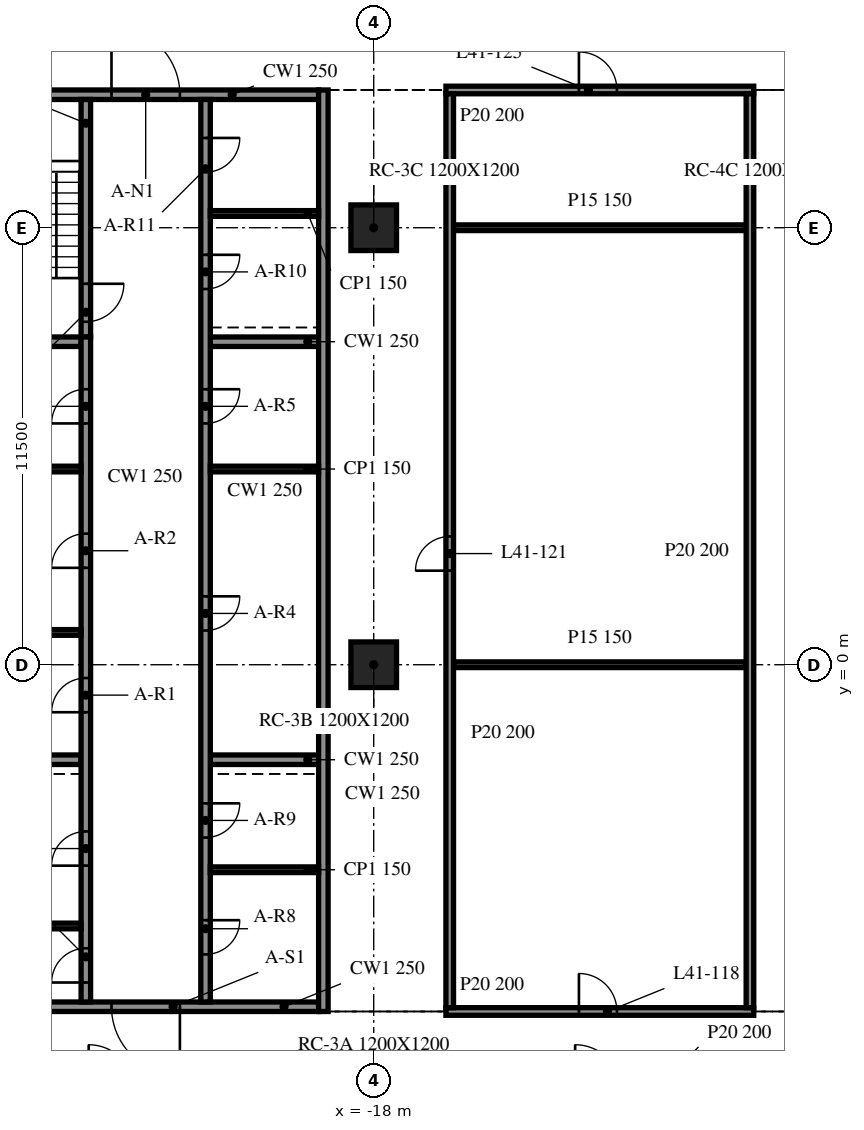
"""IFC4 building model, lengths in metres.
Left out: names, types, materials, properties, quantities, classifications, styles, units other than length and angle.
Written with IfcOpenShell. Run it as: python <this file> out.ifc"""

import sys

from ifc_helpers import new_model, si_unit, direction, frame, frame_2d, origin, origin_2d, place, context, subcontext, project, spatial, rectangle, extrude, element, fill, save


model = new_model("IFC4")
c1 = context("Model", 3, precision=1e-05, world=origin(), true_north=direction((0.0, 1.0)))
c2 = subcontext(c1, "Body", "Model", "MODEL_VIEW")
j1 = project(units=[si_unit("LENGTHUNIT", "METRE"), si_unit("PLANEANGLEUNIT", "RADIAN")], contexts=[c1])
p1 = place(None, origin())
s1 = spatial("IfcSite", under=j1, at=p1, CompositionType="ELEMENT")
p2 = place(p1, origin())
s2 = spatial("IfcBuilding", under=s1, at=p2, CompositionType="ELEMENT")
p3 = place(p2, frame((0.0, 0.0, 174.4)))
s3 = spatial("IfcBuildingStorey", under=s2, at=p3, CompositionType="ELEMENT", Elevation=174.4)
for number, where, z_axis, x_axis in (
    (1, (-18.0, 0.0, -0.34), (0.0, 0.0, 1.0), (1.0, 0.0, 0.0)),
    (2, (-18.0, 11.5, -0.34), (0.0, 0.0, 1.0), (1.0, 0.0, 0.0)),
):
    element("IfcColumn", number, at=place(p3, frame(where, z_axis=z_axis, x_axis=x_axis)), inside=s3, PredefinedType="COLUMN", context=c2, shape_type="SweptSolid", body=[
        extrude(rectangle(XDim=1.2, YDim=1.2, at=origin_2d()), origin(), (0.0, 0.0, 1.0), 3.8),
    ])
p4 = place(p3, frame((-19.325, -9.125, 0.0), z_axis=(0.0, 0.0, 1.0), x_axis=(0.0, 1.0, 0.0)))
e3 = element("IfcWall", 3, at=p4, inside=s3, PredefinedType="SOLIDWALL", context=c2, shape_type="SweptSolid", body=[
    extrude(rectangle(XDim=24.25, YDim=0.25, at=frame_2d((12.125, 0.0))), origin(), (0.0, 0.0, 1.0), 3.46),
])
p5 = place(p3, frame((-19.45, -9.0, 0.0), z_axis=(0.0, 0.0, 1.0), x_axis=(-1.0, 0.0, 0.0)))
e4 = element("IfcWall", 4, at=p5, inside=s3, PredefinedType="SOLIDWALL", context=c2, shape_type="SweptSolid", body=[
    extrude(rectangle(XDim=9.1, YDim=0.25, at=frame_2d((4.55, 0.0))), origin(), (0.0, 0.0, 1.0), 3.46),
])
p6 = place(p5, frame((3.65, 0.0, 0.0)))
e5 = element("IfcOpeningElement", 5, at=p6, cuts=e4, PredefinedType="OPENING", context=c2, shape_type="SweptSolid", body=[
    extrude(rectangle(XDim=1.8, YDim=2.1, at=frame_2d((0.9, 1.05))), frame((0.0, 0.135, 0.0), z_axis=(0.0, -1.0, 0.0), x_axis=(1.0, 0.0, 0.0)), (0.0, 0.0, 1.0), 0.27),
])
p7 = place(p3, frame((-28.55, 15.0, 0.0), z_axis=(0.0, 0.0, 1.0), x_axis=(1.0, 0.0, 0.0)))
e6 = element("IfcWall", 6, at=p7, inside=s3, PredefinedType="SOLIDWALL", context=c2, shape_type="SweptSolid", body=[
    extrude(rectangle(XDim=9.1, YDim=0.25, at=frame_2d((4.55, 0.0))), origin(), (0.0, 0.0, 1.0), 3.46),
])
p8 = place(p7, frame((3.65, 0.0, 0.0)))
e7 = element("IfcOpeningElement", 7, at=p8, cuts=e6, PredefinedType="OPENING", context=c2, shape_type="SweptSolid", body=[
    extrude(rectangle(XDim=1.8, YDim=2.1, at=frame_2d((0.9, 1.05))), frame((0.0, 0.135, 0.0), z_axis=(0.0, -1.0, 0.0), x_axis=(1.0, 0.0, 0.0)), (0.0, 0.0, 1.0), 0.27),
])
p9 = place(p3, frame((-25.575, -8.875, 0.0), z_axis=(0.0, 0.0, 1.0), x_axis=(0.0, 1.0, 0.0)))
e8 = element("IfcWall", 8, at=p9, inside=s3, PredefinedType="SOLIDWALL", context=c2, shape_type="SweptSolid", body=[
    extrude(rectangle(XDim=17.5, YDim=0.25, at=frame_2d((8.75, 0.0))), origin(), (0.0, 0.0, 1.0), 3.46),
])
p10 = place(p9, frame((7.625, 0.0, 0.0)))
e9 = element("IfcOpeningElement", 9, at=p10, cuts=e8, PredefinedType="OPENING", context=c2, shape_type="SweptSolid", body=[
    extrude(rectangle(XDim=0.9, YDim=2.1, at=frame_2d((0.45, 1.05))), frame((0.0, 0.135, 0.0), z_axis=(0.0, -1.0, 0.0), x_axis=(1.0, 0.0, 0.0)), (0.0, 0.0, 1.0), 0.27),
])
p11 = place(p9, frame((11.425, 0.0, 0.0)))
e10 = element("IfcOpeningElement", 10, at=p11, cuts=e8, PredefinedType="OPENING", context=c2, shape_type="SweptSolid", body=[
    extrude(rectangle(XDim=0.9, YDim=2.1, at=frame_2d((0.45, 1.05))), frame((0.0, 0.135, 0.0), z_axis=(0.0, -1.0, 0.0), x_axis=(1.0, 0.0, 0.0)), (0.0, 0.0, 1.0), 0.27),
])
p12 = place(p9, frame((15.225, 0.0, 0.0)))
e11 = element("IfcOpeningElement", 11, at=p12, cuts=e8, PredefinedType="OPENING", context=c2, shape_type="SweptSolid", body=[
    extrude(rectangle(XDim=0.9, YDim=2.1, at=frame_2d((0.45, 1.05))), frame((0.0, 0.135, 0.0), z_axis=(0.0, -1.0, 0.0), x_axis=(1.0, 0.0, 0.0)), (0.0, 0.0, 1.0), 0.27),
])
p13 = place(p9, frame((0.512, 0.0, 0.0)))
e12 = element("IfcOpeningElement", 12, at=p13, cuts=e8, PredefinedType="OPENING", context=c2, shape_type="SweptSolid", body=[
    extrude(rectangle(XDim=0.9, YDim=2.1, at=frame_2d((0.45, 1.05))), frame((0.0, 0.135, 0.0), z_axis=(0.0, -1.0, 0.0), x_axis=(1.0, 0.0, 0.0)), (0.0, 0.0, 1.0), 0.27),
])
p14 = place(p9, frame((3.587, 0.0, 0.0)))
e13 = element("IfcOpeningElement", 13, at=p14, cuts=e8, PredefinedType="OPENING", context=c2, shape_type="SweptSolid", body=[
    extrude(rectangle(XDim=0.9, YDim=2.1, at=frame_2d((0.45, 1.05))), frame((0.0, 0.135, 0.0), z_axis=(0.0, -1.0, 0.0), x_axis=(1.0, 0.0, 0.0)), (0.0, 0.0, 1.0), 0.27),
])
p15 = place(p3, frame((-25.575, 14.875, 0.0), z_axis=(0.0, 0.0, 1.0), x_axis=(0.0, -1.0, 0.0)))
e14 = element("IfcWall", 14, at=p15, inside=s3, PredefinedType="SOLIDWALL", context=c2, shape_type="SweptSolid", body=[
    extrude(rectangle(XDim=6.25, YDim=0.25, at=frame_2d((3.125, 0.0))), origin(), (0.0, 0.0, 1.0), 3.46),
])
p16 = place(p15, frame((4.85, 0.0, 0.0)))
e15 = element("IfcOpeningElement", 15, at=p16, cuts=e14, PredefinedType="OPENING", context=c2, shape_type="SweptSolid", body=[
    extrude(rectangle(XDim=1.0, YDim=2.1, at=frame_2d((0.5, 1.05))), frame((0.0, 0.135, 0.0), z_axis=(0.0, -1.0, 0.0), x_axis=(1.0, 0.0, 0.0)), (0.0, 0.0, 1.0), 0.27),
])
p17 = place(p3, frame((-22.425, 14.875, 0.0), z_axis=(0.0, 0.0, 1.0), x_axis=(0.0, -1.0, 0.0)))
e16 = element("IfcWall", 16, at=p17, inside=s3, PredefinedType="SOLIDWALL", context=c2, shape_type="SweptSolid", body=[
    extrude(rectangle(XDim=23.75, YDim=0.25, at=frame_2d((11.875, 0.0))), origin(), (0.0, 0.0, 1.0), 3.46),
])
p18 = place(p17, frame((13.075, 0.0, 0.0)))
e17 = element("IfcOpeningElement", 17, at=p18, cuts=e16, PredefinedType="OPENING", context=c2, shape_type="SweptSolid", body=[
    extrude(rectangle(XDim=0.9, YDim=2.1, at=frame_2d((0.45, 1.05))), frame((0.0, 0.135, 0.0), z_axis=(0.0, -1.0, 0.0), x_axis=(1.0, 0.0, 0.0)), (0.0, 0.0, 1.0), 0.27),
])
p19 = place(p17, frame((7.625, 0.0, 0.0)))
e18 = element("IfcOpeningElement", 18, at=p19, cuts=e16, PredefinedType="OPENING", context=c2, shape_type="SweptSolid", body=[
    extrude(rectangle(XDim=0.9, YDim=2.1, at=frame_2d((0.45, 1.05))), frame((0.0, 0.135, 0.0), z_axis=(0.0, -1.0, 0.0), x_axis=(1.0, 0.0, 0.0)), (0.0, 0.0, 1.0), 0.27),
])
p20 = place(p17, frame((21.597, 0.0, 0.0)))
e19 = element("IfcOpeningElement", 19, at=p20, cuts=e16, PredefinedType="OPENING", context=c2, shape_type="SweptSolid", body=[
    extrude(rectangle(XDim=0.9, YDim=2.1, at=frame_2d((0.45, 1.05))), frame((0.0, 0.135, 0.0), z_axis=(0.0, -1.0, 0.0), x_axis=(1.0, 0.0, 0.0)), (0.0, 0.0, 1.0), 0.27),
])
p21 = place(p17, frame((18.522, 0.0, 0.0)))
e20 = element("IfcOpeningElement", 20, at=p21, cuts=e16, PredefinedType="OPENING", context=c2, shape_type="SweptSolid", body=[
    extrude(rectangle(XDim=0.9, YDim=2.1, at=frame_2d((0.45, 1.05))), frame((0.0, 0.135, 0.0), z_axis=(0.0, -1.0, 0.0), x_axis=(1.0, 0.0, 0.0)), (0.0, 0.0, 1.0), 0.27),
])
p22 = place(p17, frame((4.087, 0.0, 0.0)))
e21 = element("IfcOpeningElement", 21, at=p22, cuts=e16, PredefinedType="OPENING", context=c2, shape_type="SweptSolid", body=[
    extrude(rectangle(XDim=0.9, YDim=2.1, at=frame_2d((0.45, 1.05))), frame((0.0, 0.135, 0.0), z_axis=(0.0, -1.0, 0.0), x_axis=(1.0, 0.0, 0.0)), (0.0, 0.0, 1.0), 0.27),
])
p23 = place(p17, frame((1.012, 0.0, 0.0)))
e22 = element("IfcOpeningElement", 22, at=p23, cuts=e16, PredefinedType="OPENING", context=c2, shape_type="SweptSolid", body=[
    extrude(rectangle(XDim=0.9, YDim=2.1, at=frame_2d((0.45, 1.05))), frame((0.0, 0.135, 0.0), z_axis=(0.0, -1.0, 0.0), x_axis=(1.0, 0.0, 0.0)), (0.0, 0.0, 1.0), 0.27),
])
for number, where, z_axis, x_axis in (
    (23, (-28.55, -2.5, 0.0), (0.0, 0.0, 1.0), (1.0, 0.0, 0.0)),
    (24, (-28.55, 8.5, 0.0), (0.0, 0.0, 1.0), (1.0, 0.0, 0.0)),
    (25, (-22.3, -2.5, 0.0), (0.0, 0.0, 1.0), (1.0, 0.0, 0.0)),
    (26, (-22.3, 8.5, 0.0), (0.0, 0.0, 1.0), (1.0, 0.0, 0.0)),
):
    element("IfcWall", number, at=place(p3, frame(where, z_axis=z_axis, x_axis=x_axis)), inside=s3, PredefinedType="SOLIDWALL", context=c2, shape_type="SweptSolid", body=[
        extrude(rectangle(XDim=2.85, YDim=0.25, at=frame_2d((1.425, 0.0))), origin(), (0.0, 0.0, 1.0), 3.46),
    ])
for number, where, z_axis, x_axis in (
    (27, (-28.55, 0.85, 0.0), (0.0, 0.0, 1.0), (1.0, 0.0, 0.0)),
    (28, (-28.55, 5.15, 0.0), (0.0, 0.0, 1.0), (1.0, 0.0, 0.0)),
    (29, (-22.3, 5.15, 0.0), (0.0, 0.0, 1.0), (1.0, 0.0, 0.0)),
    (30, (-28.55, -6.875, 0.0), (0.0, 0.0, 1.0), (1.0, 0.0, 0.0)),
    (31, (-22.3, -5.395, 0.0), (0.0, 0.0, 1.0), (1.0, 0.0, 0.0)),
    (32, (-22.3, 11.875, 0.0), (0.0, 0.0, 1.0), (1.0, 0.0, 0.0)),
):
    element("IfcWall", number, at=place(p3, frame(where, z_axis=z_axis, x_axis=x_axis)), inside=s3, PredefinedType="PARTITIONING", context=c2, shape_type="SweptSolid", body=[
        extrude(rectangle(XDim=2.85, YDim=0.15, at=frame_2d((1.425, 0.0))), origin(), (0.0, 0.0, 1.0), 3.46),
    ])
p24 = place(p3, frame((-16.1, -9.125, 0.0), z_axis=(0.0, 0.0, 1.0), x_axis=(1.0, 0.0, 0.0)))
e33 = element("IfcWall", 33, at=p24, inside=s3, PredefinedType="PARTITIONING", context=c2, shape_type="SweptSolid", body=[
    extrude(rectangle(XDim=8.1, YDim=0.2, at=frame_2d((4.05, 0.0))), origin(), (0.0, 0.0, 1.0), 3.46),
])
p25 = place(p24, frame((3.5, 0.0, 0.0)))
e34 = element("IfcOpeningElement", 34, at=p25, cuts=e33, PredefinedType="OPENING", context=c2, shape_type="SweptSolid", body=[
    extrude(rectangle(XDim=1.0, YDim=2.1, at=frame_2d((0.5, 1.05))), frame((0.0, 0.11, 0.0), z_axis=(0.0, -1.0, 0.0), x_axis=(1.0, 0.0, 0.0)), (0.0, 0.0, 1.0), 0.22),
])
for number, where, z_axis, x_axis in (
    (35, (-15.9, 0.0, 0.0), (0.0, 0.0, 1.0), (1.0, 0.0, 0.0)),
    (36, (-15.9, 11.5, 0.0), (0.0, 0.0, 1.0), (1.0, 0.0, 0.0)),
):
    element("IfcWall", number, at=place(p3, frame(where, z_axis=z_axis, x_axis=x_axis)), inside=s3, PredefinedType="PARTITIONING", context=c2, shape_type="SweptSolid", body=[
        extrude(rectangle(XDim=7.7, YDim=0.15, at=frame_2d((3.85, 0.0))), origin(), (0.0, 0.0, 1.0), 3.46),
    ])
p26 = place(p3, frame((-16.1, 15.125, 0.0), z_axis=(0.0, 0.0, 1.0), x_axis=(1.0, 0.0, 0.0)))
e37 = element("IfcWall", 37, at=p26, inside=s3, PredefinedType="PARTITIONING", context=c2, shape_type="SweptSolid", body=[
    extrude(rectangle(XDim=8.1, YDim=0.2, at=frame_2d((4.05, 0.0))), origin(), (0.0, 0.0, 1.0), 3.46),
])
p27 = place(p26, frame((3.5, 0.0, 0.0)))
e38 = element("IfcOpeningElement", 38, at=p27, cuts=e37, PredefinedType="OPENING", context=c2, shape_type="SweptSolid", body=[
    extrude(rectangle(XDim=1.0, YDim=2.1, at=frame_2d((0.5, 1.05))), frame((0.0, 0.11, 0.0), z_axis=(0.0, -1.0, 0.0), x_axis=(1.0, 0.0, 0.0)), (0.0, 0.0, 1.0), 0.22),
])
p28 = place(p3, frame((-16.0, -9.025, 0.0), z_axis=(0.0, 0.0, 1.0), x_axis=(0.0, 1.0, 0.0)))
e39 = element("IfcWall", 39, at=p28, inside=s3, PredefinedType="PARTITIONING", context=c2, shape_type="SweptSolid", body=[
    extrude(rectangle(XDim=24.05, YDim=0.2, at=frame_2d((12.025, 0.0))), origin(), (0.0, 0.0, 1.0), 3.46),
])
p29 = place(p28, frame((11.5, 0.0, 0.0)))
e40 = element("IfcOpeningElement", 40, at=p29, cuts=e39, PredefinedType="OPENING", context=c2, shape_type="SweptSolid", body=[
    extrude(rectangle(XDim=0.9, YDim=2.1, at=frame_2d((0.45, 1.05))), frame((0.0, 0.11, 0.0), z_axis=(0.0, -1.0, 0.0), x_axis=(1.0, 0.0, 0.0)), (0.0, 0.0, 1.0), 0.22),
])
p30 = place(p3, frame((-8.1, -9.025, 0.0), z_axis=(0.0, 0.0, 1.0), x_axis=(0.0, 1.0, 0.0)))
e41 = element("IfcWall", 41, at=p30, inside=s3, PredefinedType="PARTITIONING", context=c2, shape_type="SweptSolid", body=[
    extrude(rectangle(XDim=24.05, YDim=0.2, at=frame_2d((12.025, 0.0))), origin(), (0.0, 0.0, 1.0), 3.46),
])
p31 = place(p6, origin())
e42 = element("IfcDoor", 42, at=p31, inside=s3, OperationType="DOUBLE_DOOR_SINGLE_SWING", PredefinedType="DOOR", context=c2, shape_type="SweptSolid", body=[
    extrude(rectangle(XDim=1.8, YDim=2.1, at=frame_2d((0.9, 1.05))), frame((0.0, 0.025, 0.0), z_axis=(0.0, -1.0, 0.0), x_axis=(1.0, 0.0, 0.0)), (0.0, 0.0, 1.0), 0.05),
])
fill(e5, e42)
p32 = place(p8, origin())
e43 = element("IfcDoor", 43, at=p32, inside=s3, OperationType="DOUBLE_DOOR_SINGLE_SWING", PredefinedType="DOOR", context=c2, shape_type="SweptSolid", body=[
    extrude(rectangle(XDim=1.8, YDim=2.1, at=frame_2d((0.9, 1.05))), frame((0.0, 0.025, 0.0), z_axis=(0.0, -1.0, 0.0), x_axis=(1.0, 0.0, 0.0)), (0.0, 0.0, 1.0), 0.05),
])
fill(e7, e43)
p33 = place(p10, origin())
e44 = element("IfcDoor", 44, at=p33, inside=s3, OperationType="SINGLE_SWING_LEFT", PredefinedType="DOOR", context=c2, shape_type="SweptSolid", body=[
    extrude(rectangle(XDim=0.9, YDim=2.1, at=frame_2d((0.45, 1.05))), frame((0.0, 0.025, 0.0), z_axis=(0.0, -1.0, 0.0), x_axis=(1.0, 0.0, 0.0)), (0.0, 0.0, 1.0), 0.05),
])
fill(e9, e44)
p34 = place(p11, origin())
e45 = element("IfcDoor", 45, at=p34, inside=s3, OperationType="SINGLE_SWING_RIGHT", PredefinedType="DOOR", context=c2, shape_type="SweptSolid", body=[
    extrude(rectangle(XDim=0.9, YDim=2.1, at=frame_2d((0.45, 1.05))), frame((0.0, 0.025, 0.0), z_axis=(0.0, -1.0, 0.0), x_axis=(1.0, 0.0, 0.0)), (0.0, 0.0, 1.0), 0.05),
])
fill(e10, e45)
p35 = place(p12, origin())
e46 = element("IfcDoor", 46, at=p35, inside=s3, OperationType="SINGLE_SWING_LEFT", PredefinedType="DOOR", context=c2, shape_type="SweptSolid", body=[
    extrude(rectangle(XDim=0.9, YDim=2.1, at=frame_2d((0.45, 1.05))), frame((0.0, 0.025, 0.0), z_axis=(0.0, -1.0, 0.0), x_axis=(1.0, 0.0, 0.0)), (0.0, 0.0, 1.0), 0.05),
])
fill(e11, e46)
p36 = place(p18, origin())
e47 = element("IfcDoor", 47, at=p36, inside=s3, OperationType="SINGLE_SWING_RIGHT", PredefinedType="DOOR", context=c2, shape_type="SweptSolid", body=[
    extrude(rectangle(XDim=0.9, YDim=2.1, at=frame_2d((0.45, 1.05))), frame((0.0, 0.025, 0.0), z_axis=(0.0, -1.0, 0.0), x_axis=(1.0, 0.0, 0.0)), (0.0, 0.0, 1.0), 0.05),
])
fill(e17, e47)
p37 = place(p19, origin())
e48 = element("IfcDoor", 48, at=p37, inside=s3, OperationType="SINGLE_SWING_LEFT", PredefinedType="DOOR", context=c2, shape_type="SweptSolid", body=[
    extrude(rectangle(XDim=0.9, YDim=2.1, at=frame_2d((0.45, 1.05))), frame((0.0, 0.025, 0.0), z_axis=(0.0, -1.0, 0.0), x_axis=(1.0, 0.0, 0.0)), (0.0, 0.0, 1.0), 0.05),
])
fill(e18, e48)
p38 = place(p13, origin())
e49 = element("IfcDoor", 49, at=p38, inside=s3, OperationType="SINGLE_SWING_RIGHT", PredefinedType="DOOR", context=c2, shape_type="SweptSolid", body=[
    extrude(rectangle(XDim=0.9, YDim=2.1, at=frame_2d((0.45, 1.05))), frame((0.0, 0.025, 0.0), z_axis=(0.0, -1.0, 0.0), x_axis=(1.0, 0.0, 0.0)), (0.0, 0.0, 1.0), 0.05),
])
fill(e12, e49)
p39 = place(p14, origin())
e50 = element("IfcDoor", 50, at=p39, inside=s3, OperationType="SINGLE_SWING_LEFT", PredefinedType="DOOR", context=c2, shape_type="SweptSolid", body=[
    extrude(rectangle(XDim=0.9, YDim=2.1, at=frame_2d((0.45, 1.05))), frame((0.0, 0.025, 0.0), z_axis=(0.0, -1.0, 0.0), x_axis=(1.0, 0.0, 0.0)), (0.0, 0.0, 1.0), 0.05),
])
fill(e13, e50)
p40 = place(p20, origin())
e51 = element("IfcDoor", 51, at=p40, inside=s3, OperationType="SINGLE_SWING_RIGHT", PredefinedType="DOOR", context=c2, shape_type="SweptSolid", body=[
    extrude(rectangle(XDim=0.9, YDim=2.1, at=frame_2d((0.45, 1.05))), frame((0.0, 0.025, 0.0), z_axis=(0.0, -1.0, 0.0), x_axis=(1.0, 0.0, 0.0)), (0.0, 0.0, 1.0), 0.05),
])
fill(e19, e51)
p41 = place(p21, origin())
e52 = element("IfcDoor", 52, at=p41, inside=s3, OperationType="SINGLE_SWING_LEFT", PredefinedType="DOOR", context=c2, shape_type="SweptSolid", body=[
    extrude(rectangle(XDim=0.9, YDim=2.1, at=frame_2d((0.45, 1.05))), frame((0.0, 0.025, 0.0), z_axis=(0.0, -1.0, 0.0), x_axis=(1.0, 0.0, 0.0)), (0.0, 0.0, 1.0), 0.05),
])
fill(e20, e52)
p42 = place(p22, origin())
e53 = element("IfcDoor", 53, at=p42, inside=s3, OperationType="SINGLE_SWING_RIGHT", PredefinedType="DOOR", context=c2, shape_type="SweptSolid", body=[
    extrude(rectangle(XDim=0.9, YDim=2.1, at=frame_2d((0.45, 1.05))), frame((0.0, 0.025, 0.0), z_axis=(0.0, -1.0, 0.0), x_axis=(1.0, 0.0, 0.0)), (0.0, 0.0, 1.0), 0.05),
])
fill(e21, e53)
p43 = place(p23, origin())
e54 = element("IfcDoor", 54, at=p43, inside=s3, OperationType="SINGLE_SWING_LEFT", PredefinedType="DOOR", context=c2, shape_type="SweptSolid", body=[
    extrude(rectangle(XDim=0.9, YDim=2.1, at=frame_2d((0.45, 1.05))), frame((0.0, 0.025, 0.0), z_axis=(0.0, -1.0, 0.0), x_axis=(1.0, 0.0, 0.0)), (0.0, 0.0, 1.0), 0.05),
])
fill(e22, e54)
p44 = place(p16, origin())
e55 = element("IfcDoor", 55, at=p44, inside=s3, OperationType="SINGLE_SWING_RIGHT", PredefinedType="DOOR", context=c2, shape_type="SweptSolid", body=[
    extrude(rectangle(XDim=1.0, YDim=2.1, at=frame_2d((0.5, 1.05))), frame((0.0, 0.025, 0.0), z_axis=(0.0, -1.0, 0.0), x_axis=(1.0, 0.0, 0.0)), (0.0, 0.0, 1.0), 0.05),
])
fill(e15, e55)
p45 = place(p25, origin())
e56 = element("IfcDoor", 56, at=p45, inside=s3, OperationType="SINGLE_SWING_LEFT", PredefinedType="DOOR", context=c2, shape_type="SweptSolid", body=[
    extrude(rectangle(XDim=1.0, YDim=2.1, at=frame_2d((0.5, 1.05))), frame((0.0, 0.025, 0.0), z_axis=(0.0, -1.0, 0.0), x_axis=(1.0, 0.0, 0.0)), (0.0, 0.0, 1.0), 0.05),
])
fill(e34, e56)
p46 = place(p29, origin())
e57 = element("IfcDoor", 57, at=p46, inside=s3, OperationType="SINGLE_SWING_RIGHT", PredefinedType="DOOR", context=c2, shape_type="SweptSolid", body=[
    extrude(rectangle(XDim=0.9, YDim=2.1, at=frame_2d((0.45, 1.05))), frame((0.0, 0.025, 0.0), z_axis=(0.0, -1.0, 0.0), x_axis=(1.0, 0.0, 0.0)), (0.0, 0.0, 1.0), 0.05),
])
fill(e40, e57)
p47 = place(p27, origin())
e58 = element("IfcDoor", 58, at=p47, inside=s3, OperationType="SINGLE_SWING_RIGHT", PredefinedType="DOOR", context=c2, shape_type="SweptSolid", body=[
    extrude(rectangle(XDim=1.0, YDim=2.1, at=frame_2d((0.5, 1.05))), frame((0.0, 0.025, 0.0), z_axis=(0.0, -1.0, 0.0), x_axis=(1.0, 0.0, 0.0)), (0.0, 0.0, 1.0), 0.05),
])
fill(e38, e58)
save(model, sys.argv[1])
